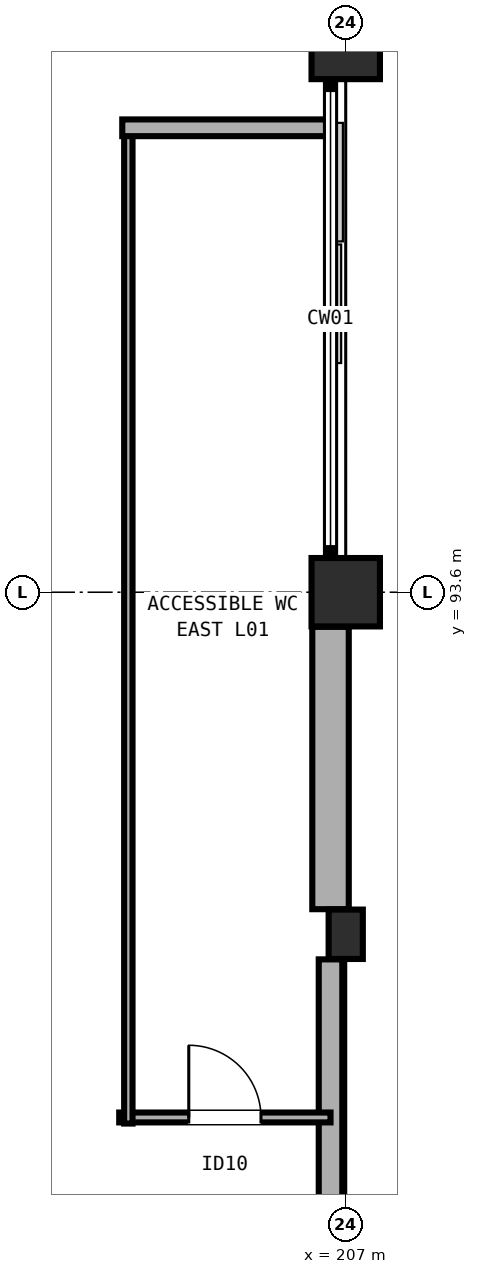
"""IFC4 building model, lengths in metres.
Left out: names, types, materials, properties, quantities, classifications, styles, units other than length and angle.
Written with IfcOpenShell. Run it as: python <this file> out.ifc"""

import sys

from ifc_helpers import new_model, si_unit, direction, frame, frame_2d, origin, origin_2d, place, context, subcontext, project, spatial, rectangle, extrude, element, fill, save


model = new_model("IFC4")
c1 = context("Model", 3, precision=1e-05, world=origin(), true_north=direction((0.0, 1.0)))
c2 = subcontext(c1, "Body", "Model", "MODEL_VIEW")
j1 = project(units=[si_unit("LENGTHUNIT", "METRE"), si_unit("PLANEANGLEUNIT", "RADIAN")], contexts=[c1])
p1 = place(None, origin())
s1 = spatial("IfcSite", under=j1, at=p1, CompositionType="ELEMENT")
p2 = place(p1, origin())
s2 = spatial("IfcBuilding", under=s1, at=p2, CompositionType="ELEMENT")
p3 = place(p2, frame((0.0, 0.0, 4.8)))
s3 = spatial("IfcBuildingStorey", under=s2, at=p3, CompositionType="ELEMENT", Elevation=4.8)
for number, where, z_axis, x_axis in (
    (1, (207.0, 93.6, 0.0), (0.0, 0.0, 1.0), (1.0, 0.0, 0.0)),
    (2, (207.0, 100.8, 0.0), (0.0, 0.0, 1.0), (1.0, 0.0, 0.0)),
):
    element("IfcColumn", number, at=place(p3, frame(where, z_axis=z_axis, x_axis=x_axis)), inside=s3, PredefinedType="COLUMN", context=c2, shape_type="SweptSolid", body=[
        extrude(rectangle(XDim=0.9, YDim=0.9, at=origin_2d()), origin(), (0.0, 0.0, 1.0), 4.8),
    ])
p4 = place(p3, frame((207.0, 89.1, 0.0), z_axis=(0.0, 0.0, 1.0), x_axis=(1.0, 0.0, 0.0)))
e3 = element("IfcColumn", 3, at=p4, inside=s3, PredefinedType="PILASTER", context=c2, shape_type="SweptSolid", body=[
    extrude(rectangle(XDim=0.45, YDim=0.65, at=origin_2d()), origin(), (0.0, 0.0, 1.0), 4.8),
])
p5 = place(p3, frame((206.8, 93.145, 0.0), z_axis=(0.0, 0.0, 1.0), x_axis=(0.0, -1.0, 0.0)))
e4 = element("IfcWall", 4, at=p5, inside=s3, PredefinedType="SOLIDWALL", context=c2, shape_type="SweptSolid", body=[
    extrude(rectangle(XDim=3.715, YDim=0.48, at=frame_2d((1.857, 0.0))), origin(), (0.0, 0.0, 1.0), 3.58),
])
p6 = place(p3, frame((206.8, 88.77, 0.0), z_axis=(0.0, 0.0, 1.0), x_axis=(0.0, -1.0, 0.0)))
e5 = element("IfcWall", 5, at=p6, inside=s3, PredefinedType="SOLIDWALL", context=c2, shape_type="SweptSolid", body=[
    extrude(rectangle(XDim=3.715, YDim=0.31, at=frame_2d((1.857, 0.0))), origin(), (0.0, 0.0, 1.0), 3.58),
])
p7 = place(p3, frame((204.02, 86.69, 0.0), z_axis=(0.0, 0.0, 1.0), x_axis=(1.0, 0.0, 0.0)))
e6 = element("IfcWall", 6, at=p7, inside=s3, PredefinedType="PARTITIONING", context=c2, shape_type="SweptSolid", body=[
    extrude(rectangle(XDim=2.78, YDim=0.13, at=frame_2d((1.39, 0.0))), origin(), (0.0, 0.0, 1.0), 3.28),
])
p8 = place(p7, frame((0.915, 0.0, 0.0)))
e7 = element("IfcOpeningElement", 7, at=p8, cuts=e6, PredefinedType="OPENING", context=c2, shape_type="SweptSolid", body=[
    extrude(rectangle(XDim=0.95, YDim=2.18, at=frame_2d((0.475, 1.09))), frame((0.0, 0.075, 0.0), z_axis=(0.0, -1.0, 0.0), x_axis=(1.0, 0.0, 0.0)), (0.0, 0.0, 1.0), 0.15),
])
p9 = place(p3, frame((204.14, 86.61, 0.0), z_axis=(0.0, 0.0, 1.0), x_axis=(0.0, 1.0, 0.0)))
e8 = element("IfcWall", 8, at=p9, inside=s3, PredefinedType="PARTITIONING", context=c2, shape_type="SweptSolid", body=[
    extrude(rectangle(XDim=13.18, YDim=0.11, at=frame_2d((6.59, 0.0))), origin(), (0.0, 0.0, 1.0), 3.28),
])
p10 = place(p3, frame((204.06, 99.71, 0.0), z_axis=(0.0, 0.0, 1.0), x_axis=(1.0, 0.0, 0.0)))
e9 = element("IfcWall", 9, at=p10, inside=s3, PredefinedType="PARTITIONING", context=c2, shape_type="SweptSolid", body=[
    extrude(rectangle(XDim=2.707, YDim=0.22, at=frame_2d((1.354, 0.0))), origin(), (0.0, 0.0, 1.0), 3.28),
])
p11 = place(p8, origin())
e10 = element("IfcDoor", 10, at=p11, inside=s3, OperationType="SINGLE_SWING_LEFT", PredefinedType="DOOR", context=c2, shape_type="SweptSolid", body=[
    extrude(rectangle(XDim=0.95, YDim=2.18, at=frame_2d((0.475, 1.09))), frame((0.0, 0.025, 0.0), z_axis=(0.0, -1.0, 0.0), x_axis=(1.0, 0.0, 0.0)), (0.0, 0.0, 1.0), 0.05),
])
fill(e7, e10)
save(model, sys.argv[1])
